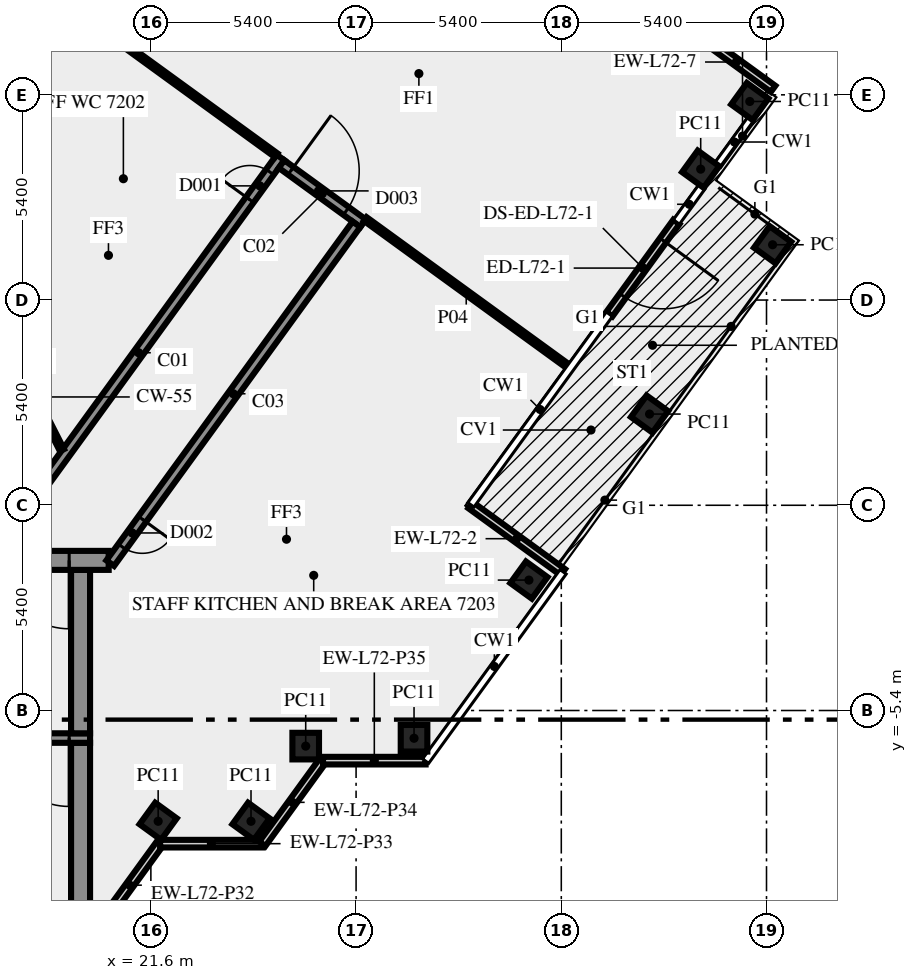
"""IFC4 building model, lengths in metres.
Left out: names, types, materials, properties, quantities, classifications, styles, units other than length and angle.
Written with IfcOpenShell. Run it as: python <this file> out.ifc"""

import sys

from ifc_helpers import new_model, si_unit, direction, frame, frame_2d, origin, origin_2d, place, context, subcontext, project, spatial, rectangle, extrude, element, fill, save


model = new_model("IFC4")
c1 = context("Model", 3, precision=1e-05, world=origin(), true_north=direction((0.0, 1.0)))
c2 = subcontext(c1, "Body", "Model", "MODEL_VIEW")
j1 = project(units=[si_unit("LENGTHUNIT", "METRE"), si_unit("PLANEANGLEUNIT", "RADIAN")], contexts=[c1])
p1 = place(None, origin())
s1 = spatial("IfcSite", under=j1, at=p1, CompositionType="ELEMENT")
p2 = place(p1, origin())
s2 = spatial("IfcBuilding", under=s1, at=p2, CompositionType="ELEMENT")
p3 = place(p2, frame((0.0, 0.0, 311.0)))
s3 = spatial("IfcBuildingStorey", under=s2, at=p3, CompositionType="ELEMENT", Elevation=311.0)
for number, where, z_axis, x_axis in (
    (1, (21.792, -8.315, 0.0), (0.0, 0.0, 1.0), (0.588, 0.809, 0.0)),
    (2, (24.235, -8.315, 0.0), (0.0, 0.0, 1.0), (0.588, 0.809, 0.0)),
    (3, (25.674, -6.337, 0.0), (0.0, 0.0, 1.0), (1.0, 0.0, 0.0)),
    (4, (28.525, -6.13, 0.0), (0.0, 0.0, 1.0), (1.0, 0.0, 0.0)),
    (5, (31.548, -1.969, 0.0), (0.0, 0.0, 1.0), (0.588, 0.809, 0.0)),
    (6, (34.722, 2.4, 0.0), (0.0, 0.0, 1.0), (0.588, 0.809, 0.0)),
    (7, (37.96, 6.855, 0.0), (0.0, 0.0, 1.0), (0.588, 0.809, 0.0)),
    (8, (36.068, 8.844, 0.0), (0.0, 0.0, 1.0), (0.588, 0.809, 0.0)),
    (9, (37.36, 10.625, 0.0), (0.0, 0.0, 1.0), (0.588, 0.809, 0.0)),
):
    element("IfcColumn", number, at=place(p3, frame(where, z_axis=z_axis, x_axis=x_axis)), inside=s3, PredefinedType="COLUMN", context=c2, shape_type="SweptSolid", body=[
        extrude(rectangle(XDim=0.7, YDim=0.7, at=origin_2d()), origin(), (0.0, 0.0, 1.0), 3.65),
    ])
p4 = place(p3, frame((32.441, -1.761, 0.0), z_axis=(0.0, 0.0, 1.0), x_axis=(-0.808999938455, 0.587808727036, 0.0)))
e10 = element("IfcWall", 10, at=p4, inside=s3, PredefinedType="SOLIDWALL", context=c2, shape_type="SweptSolid", body=[
    extrude(rectangle(XDim=3.0, YDim=0.2, at=frame_2d((1.5, 0.0))), origin(), (0.0, 0.0, 1.0), 3.65),
])
p5 = place(p3, frame((35.428, 7.455, 0.0), z_axis=(0.0, 0.0, 1.0), x_axis=(-0.587755461469, -0.809038637837, 0.0)))
e11 = element("IfcWall", 11, at=p5, inside=s3, PredefinedType="SOLIDWALL", context=c2, shape_type="SweptSolid", body=[
    extrude(rectangle(XDim=3.0, YDim=0.2, at=frame_2d((1.5, 0.0))), origin(), (0.0, 0.0, 1.0), 3.65),
])
p6 = place(p5, frame((0.6, 0.0, 0.0)))
e12 = element("IfcOpeningElement", 12, at=p6, cuts=e11, PredefinedType="OPENING", context=c2, shape_type="SweptSolid", body=[
    extrude(rectangle(XDim=1.8, YDim=2.4, at=frame_2d((0.9, 1.2))), frame((0.0, 0.11, 0.0), z_axis=(0.0, -1.0, 0.0), x_axis=(1.0, 0.0, 0.0)), (0.0, 0.0, 1.0), 0.22),
])
p7 = place(p3, frame((37.974, 10.958, 0.0), z_axis=(0.0, 0.0, 1.0), x_axis=(-0.809026317077, 0.587772420479, 0.0)))
e13 = element("IfcWall", 13, at=p7, inside=s3, PredefinedType="SOLIDWALL", context=c2, shape_type="SweptSolid", body=[
    extrude(rectangle(XDim=2.4, YDim=0.2, at=frame_2d((1.2, 0.0))), origin(), (0.0, 0.0, 1.0), 3.65),
])
p8 = place(p3, frame((20.253, -11.083, 0.0), z_axis=(0.0, 0.0, 1.0), x_axis=(0.587766567315, 0.809030569476, 0.0)))
e14 = element("IfcWall", 14, at=p8, inside=s3, PredefinedType="SOLIDWALL", context=c2, shape_type="SweptSolid", body=[
    extrude(rectangle(XDim=2.688, YDim=0.2, at=frame_2d((1.344, 0.0))), origin(), (0.0, 0.0, 1.0), 3.65),
])
p9 = place(p3, frame((21.843, -8.904, 0.0), z_axis=(0.0, 0.0, 1.0), x_axis=(1.0, 0.0, 0.0)))
e15 = element("IfcWall", 15, at=p9, inside=s3, PredefinedType="SOLIDWALL", context=c2, shape_type="SweptSolid", body=[
    extrude(rectangle(XDim=2.7, YDim=0.2, at=frame_2d((1.35, 0.0))), origin(), (0.0, 0.0, 1.0), 3.65),
])
p10 = place(p3, frame((24.533, -8.909, 0.0), z_axis=(0.0, 0.0, 1.0), x_axis=(0.587720002413, 0.809064397168, 0.0)))
e16 = element("IfcWall", 16, at=p10, inside=s3, PredefinedType="SOLIDWALL", context=c2, shape_type="SweptSolid", body=[
    extrude(rectangle(XDim=2.7, YDim=0.2, at=frame_2d((1.35, 0.0))), origin(), (0.0, 0.0, 1.0), 3.65),
])
p11 = place(p3, frame((26.13, -6.719, 0.0), z_axis=(0.0, 0.0, 1.0), x_axis=(1.0, 0.0, 0.0)))
e17 = element("IfcWall", 17, at=p11, inside=s3, PredefinedType="SOLIDWALL", context=c2, shape_type="SweptSolid", body=[
    extrude(rectangle(XDim=2.7, YDim=0.2, at=frame_2d((1.35, 0.0))), origin(), (0.0, 0.0, 1.0), 3.65),
])
p12 = place(p3, frame((19.75, -10.5, 0.0), z_axis=(0.0, 0.0, 1.0), x_axis=(0.0, 1.0, 0.0)))
e18 = element("IfcWall", 18, at=p12, inside=s3, PredefinedType="SHEAR", context=c2, shape_type="SweptSolid", body=[
    extrude(rectangle(XDim=4.25, YDim=0.5, at=frame_2d((2.125, 0.0))), origin(), (0.0, 0.0, 1.0), 3.65),
])
p13 = place(p3, frame((20.0, -6.125, 0.0), z_axis=(0.0, 0.0, 1.0), x_axis=(-1.0, 0.0, 0.0)))
e19 = element("IfcWall", 19, at=p13, inside=s3, PredefinedType="SHEAR", context=c2, shape_type="SweptSolid", body=[
    extrude(rectangle(XDim=10.2, YDim=0.25, at=frame_2d((5.1, 0.0))), origin(), (0.0, 0.0, 1.0), 3.65),
])
p14 = place(p13, frame((0.55, 0.0, 0.0)))
e20 = element("IfcOpeningElement", 20, at=p14, cuts=e19, PredefinedType="OPENING", context=c2, shape_type="SweptSolid", body=[
    extrude(rectangle(XDim=1.8, YDim=2.1, at=frame_2d((0.9, 1.05))), frame((0.0, 0.135, 0.0), z_axis=(0.0, -1.0, 0.0), x_axis=(1.0, 0.0, 0.0)), (0.0, 0.0, 1.0), 0.27),
])
p15 = place(p3, frame((19.75, -6.0, 0.0), z_axis=(0.0, 0.0, 1.0), x_axis=(0.0, 1.0, 0.0)))
e21 = element("IfcWall", 21, at=p15, inside=s3, PredefinedType="SHEAR", context=c2, shape_type="SweptSolid", body=[
    extrude(rectangle(XDim=4.3, YDim=0.5, at=frame_2d((2.15, 0.0))), origin(), (0.0, 0.0, 1.0), 3.65),
])
p16 = place(p3, frame((20.49, -1.45, 0.0), z_axis=(0.0, 0.0, 1.0), x_axis=(-1.0, 0.0, 0.0)))
e22 = element("IfcWall", 22, at=p16, inside=s3, PredefinedType="SHEAR", context=c2, shape_type="SweptSolid", body=[
    extrude(rectangle(XDim=40.98, YDim=0.5, at=frame_2d((20.49, 0.0))), origin(), (0.0, 0.0, 1.0), 3.65),
])
p17 = place(p16, frame((38.14, 0.0, 0.0)))
e23 = element("IfcOpeningElement", 23, at=p17, cuts=e22, PredefinedType="OPENING", context=c2, shape_type="SweptSolid", body=[
    extrude(rectangle(XDim=1.8, YDim=2.1, at=frame_2d((0.9, 1.05))), frame((0.0, 0.26, 0.0), z_axis=(0.0, -1.0, 0.0), x_axis=(1.0, 0.0, 0.0)), (0.0, 0.0, 1.0), 0.52),
])
p18 = place(p16, frame((35.89, 0.0, 0.0)))
e24 = element("IfcOpeningElement", 24, at=p18, cuts=e22, PredefinedType="OPENING", context=c2, shape_type="SweptSolid", body=[
    extrude(rectangle(XDim=0.9, YDim=2.1, at=frame_2d((0.45, 1.05))), frame((0.0, 0.26, 0.0), z_axis=(0.0, -1.0, 0.0), x_axis=(1.0, 0.0, 0.0)), (0.0, 0.0, 1.0), 0.52),
])
p19 = place(p16, frame((32.94, 0.0, 0.0)))
e25 = element("IfcOpeningElement", 25, at=p19, cuts=e22, PredefinedType="OPENING", context=c2, shape_type="SweptSolid", body=[
    extrude(rectangle(XDim=0.9, YDim=2.1, at=frame_2d((0.45, 1.05))), frame((0.0, 0.26, 0.0), z_axis=(0.0, -1.0, 0.0), x_axis=(1.0, 0.0, 0.0)), (0.0, 0.0, 1.0), 0.52),
])
p20 = place(p16, frame((31.015, 0.0, 0.0)))
e26 = element("IfcOpeningElement", 26, at=p20, cuts=e22, PredefinedType="OPENING", context=c2, shape_type="SweptSolid", body=[
    extrude(rectangle(XDim=0.8, YDim=2.1, at=frame_2d((0.4, 1.05))), frame((0.0, 0.26, 0.0), z_axis=(0.0, -1.0, 0.0), x_axis=(1.0, 0.0, 0.0)), (0.0, 0.0, 1.0), 0.52),
])
p21 = place(p16, frame((24.765, 0.0, 0.0)))
e27 = element("IfcOpeningElement", 27, at=p21, cuts=e22, PredefinedType="OPENING", context=c2, shape_type="SweptSolid", body=[
    extrude(rectangle(XDim=0.8, YDim=2.1, at=frame_2d((0.4, 1.05))), frame((0.0, 0.26, 0.0), z_axis=(0.0, -1.0, 0.0), x_axis=(1.0, 0.0, 0.0)), (0.0, 0.0, 1.0), 0.52),
])
p22 = place(p16, frame((21.765, 0.0, 0.0)))
e28 = element("IfcOpeningElement", 28, at=p22, cuts=e22, PredefinedType="OPENING", context=c2, shape_type="SweptSolid", body=[
    extrude(rectangle(XDim=2.0, YDim=2.1, at=frame_2d((1.0, 1.05))), frame((0.0, 0.26, 0.0), z_axis=(0.0, -1.0, 0.0), x_axis=(1.0, 0.0, 0.0)), (0.0, 0.0, 1.0), 0.52),
])
p23 = place(p16, frame((12.24, 0.0, 0.0)))
e29 = element("IfcOpeningElement", 29, at=p23, cuts=e22, PredefinedType="OPENING", context=c2, shape_type="SweptSolid", body=[
    extrude(rectangle(XDim=0.9, YDim=2.1, at=frame_2d((0.45, 1.05))), frame((0.0, 0.26, 0.0), z_axis=(0.0, -1.0, 0.0), x_axis=(1.0, 0.0, 0.0)), (0.0, 0.0, 1.0), 0.52),
])
p24 = place(p16, frame((7.14, 0.0, 0.0)))
e30 = element("IfcOpeningElement", 30, at=p24, cuts=e22, PredefinedType="OPENING", context=c2, shape_type="SweptSolid", body=[
    extrude(rectangle(XDim=0.9, YDim=2.1, at=frame_2d((0.45, 1.05))), frame((0.0, 0.26, 0.0), z_axis=(0.0, -1.0, 0.0), x_axis=(1.0, 0.0, 0.0)), (0.0, 0.0, 1.0), 0.52),
])
p25 = place(p16, frame((5.028, 0.0, 0.0)))
e31 = element("IfcOpeningElement", 31, at=p25, cuts=e22, PredefinedType="OPENING", context=c2, shape_type="SweptSolid", body=[
    extrude(rectangle(XDim=0.8, YDim=2.1, at=frame_2d((0.4, 1.05))), frame((0.0, 0.26, 0.0), z_axis=(0.0, -1.0, 0.0), x_axis=(1.0, 0.0, 0.0)), (0.0, 0.0, 1.0), 0.52),
])
p26 = place(p16, frame((3.452, 0.0, 0.0)))
e32 = element("IfcOpeningElement", 32, at=p26, cuts=e22, PredefinedType="OPENING", context=c2, shape_type="SweptSolid", body=[
    extrude(rectangle(XDim=0.8, YDim=2.1, at=frame_2d((0.4, 1.05))), frame((0.0, 0.26, 0.0), z_axis=(0.0, -1.0, 0.0), x_axis=(1.0, 0.0, 0.0)), (0.0, 0.0, 1.0), 0.52),
])
p27 = place(p16, frame((1.04, 0.0, 0.0)))
e33 = element("IfcOpeningElement", 33, at=p27, cuts=e22, PredefinedType="OPENING", context=c2, shape_type="SweptSolid", body=[
    extrude(rectangle(XDim=1.8, YDim=2.1, at=frame_2d((0.9, 1.05))), frame((0.0, 0.26, 0.0), z_axis=(0.0, -1.0, 0.0), x_axis=(1.0, 0.0, 0.0)), (0.0, 0.0, 1.0), 0.52),
])
p28 = place(p3, frame((17.545, -1.125, 0.0), z_axis=(0.0, 0.0, 1.0), x_axis=(0.587796810203, 0.809008596935, 0.0)))
e34 = element("IfcWall", 34, at=p28, inside=s3, PredefinedType="SOLIDWALL", context=c2, shape_type="SweptSolid", body=[
    extrude(rectangle(XDim=12.703, YDim=0.25, at=frame_2d((6.352, 0.0))), origin(), (0.0, 0.0, 1.0), 3.65),
])
p29 = place(p28, frame((11.329, 0.0, 0.0)))
e35 = element("IfcOpeningElement", 35, at=p29, cuts=e34, PredefinedType="OPENING", context=c2, shape_type="SweptSolid", body=[
    extrude(rectangle(XDim=0.9, YDim=2.1, at=frame_2d((0.45, 1.05))), frame((0.0, 0.135, 0.0), z_axis=(0.0, -1.0, 0.0), x_axis=(1.0, 0.0, 0.0)), (0.0, 0.0, 1.0), 0.27),
])
p30 = place(p3, frame((25.039, 8.978, 0.0), z_axis=(0.0, 0.0, 1.0), x_axis=(0.809006914995, -0.587799125119, 0.0)))
e36 = element("IfcWall", 36, at=p30, inside=s3, PredefinedType="SOLIDWALL", context=c2, shape_type="SweptSolid", body=[
    extrude(rectangle(XDim=2.65, YDim=0.25, at=frame_2d((1.325, 0.0))), origin(), (0.0, 0.0, 1.0), 3.65),
])
p31 = place(p30, frame((0.301, 0.0, 0.0)))
e37 = element("IfcOpeningElement", 37, at=p31, cuts=e36, PredefinedType="OPENING", context=c2, shape_type="SweptSolid", body=[
    extrude(rectangle(XDim=1.8, YDim=2.1, at=frame_2d((0.9, 1.05))), frame((0.0, 0.135, 0.0), z_axis=(0.0, -1.0, 0.0), x_axis=(1.0, 0.0, 0.0)), (0.0, 0.0, 1.0), 0.27),
])
p32 = place(p3, frame((27.009, 7.392, 0.0), z_axis=(0.0, 0.0, 1.0), x_axis=(-0.587776457057, -0.809023384414, 0.0)))
e38 = element("IfcWall", 38, at=p32, inside=s3, PredefinedType="SOLIDWALL", context=c2, shape_type="SweptSolid", body=[
    extrude(rectangle(XDim=11.021, YDim=0.25, at=frame_2d((5.51, 0.0))), origin(), (0.0, 0.0, 1.0), 3.65),
])
p33 = place(p32, frame((9.588, 0.0, 0.0)))
e39 = element("IfcOpeningElement", 39, at=p33, cuts=e38, PredefinedType="OPENING", context=c2, shape_type="SweptSolid", body=[
    extrude(rectangle(XDim=0.9, YDim=2.1, at=frame_2d((0.45, 1.05))), frame((0.0, 0.135, 0.0), z_axis=(0.0, -1.0, 0.0), x_axis=(1.0, 0.0, 0.0)), (0.0, 0.0, 1.0), 0.27),
])
p34 = place(p3, frame((24.898, 9.21, 0.0), z_axis=(0.0, 0.0, 1.0), x_axis=(-0.809046636998, 0.587744450559, 0.0)))
e40 = element("IfcWall", 40, at=p34, inside=s3, PredefinedType="PARTITIONING", context=c2, shape_type="SweptSolid", body=[
    extrude(rectangle(XDim=9.549, YDim=0.12, at=frame_2d((4.775, 0.0))), origin(), (0.0, 0.0, 1.0), 2.95),
])
p35 = place(p3, frame((27.241, 7.533, 0.0), z_axis=(0.0, 0.0, 1.0), x_axis=(0.809057351259, -0.587729701796, 0.0)))
e41 = element("IfcWall", 41, at=p35, inside=s3, PredefinedType="PARTITIONING", context=c2, shape_type="SweptSolid", body=[
    extrude(rectangle(XDim=6.57, YDim=0.12, at=frame_2d((3.285, 0.0))), origin(), (0.0, 0.0, 1.0), 3.65),
])
p36 = place(p3, frame((18.0, 3.925, 0.0), z_axis=(0.0, 0.0, 1.0), x_axis=(0.453950796792, -0.891026752736, 0.0)))
e42 = element("IfcWall", 42, at=p36, inside=s3, PredefinedType="PARTITIONING", context=c2, shape_type="SweptSolid", body=[
    extrude(rectangle(XDim=2.778, YDim=0.12, at=frame_2d((1.389, 0.0))), origin(), (0.0, 0.0, 1.0), 3.65),
])
p37 = place(p6, origin())
e43 = element("IfcDoor", 43, at=p37, inside=s3, OperationType="DOUBLE_DOOR_SINGLE_SWING", PredefinedType="DOOR", context=c2, shape_type="SweptSolid", body=[
    extrude(rectangle(XDim=1.8, YDim=2.4, at=frame_2d((0.9, 1.2))), frame((0.0, 0.025, 0.0), z_axis=(0.0, -1.0, 0.0), x_axis=(1.0, 0.0, 0.0)), (0.0, 0.0, 1.0), 0.05),
])
fill(e12, e43)
p38 = place(p14, origin())
e44 = element("IfcDoor", 44, at=p38, inside=s3, OperationType="DOUBLE_DOOR_SINGLE_SWING", PredefinedType="DOOR", context=c2, shape_type="SweptSolid", body=[
    extrude(rectangle(XDim=1.8, YDim=2.1, at=frame_2d((0.9, 1.05))), frame((0.0, 0.025, 0.0), z_axis=(0.0, -1.0, 0.0), x_axis=(1.0, 0.0, 0.0)), (0.0, 0.0, 1.0), 0.05),
])
fill(e20, e44)
p39 = place(p27, origin())
e45 = element("IfcDoor", 45, at=p39, inside=s3, OperationType="DOUBLE_DOOR_SINGLE_SWING", PredefinedType="DOOR", context=c2, shape_type="SweptSolid", body=[
    extrude(rectangle(XDim=1.8, YDim=2.1, at=frame_2d((0.9, 1.05))), frame((0.0, 0.025, 0.0), z_axis=(0.0, -1.0, 0.0), x_axis=(1.0, 0.0, 0.0)), (0.0, 0.0, 1.0), 0.05),
])
fill(e33, e45)
p40 = place(p29, origin())
e46 = element("IfcDoor", 46, at=p40, inside=s3, OperationType="SINGLE_SWING_RIGHT", PredefinedType="DOOR", context=c2, shape_type="SweptSolid", body=[
    extrude(rectangle(XDim=0.9, YDim=2.1, at=frame_2d((0.45, 1.05))), frame((0.0, 0.025, 0.0), z_axis=(0.0, -1.0, 0.0), x_axis=(1.0, 0.0, 0.0)), (0.0, 0.0, 1.0), 0.05),
])
fill(e35, e46)
p41 = place(p31, origin())
e47 = element("IfcDoor", 47, at=p41, inside=s3, OperationType="DOUBLE_DOOR_SINGLE_SWING", PredefinedType="DOOR", context=c2, shape_type="SweptSolid", body=[
    extrude(rectangle(XDim=1.8, YDim=2.1, at=frame_2d((0.9, 1.05))), frame((0.0, 0.025, 0.0), z_axis=(0.0, -1.0, 0.0), x_axis=(1.0, 0.0, 0.0)), (0.0, 0.0, 1.0), 0.05),
])
fill(e37, e47)
p42 = place(p33, origin())
e48 = element("IfcDoor", 48, at=p42, inside=s3, OperationType="SINGLE_SWING_RIGHT", PredefinedType="DOOR", context=c2, shape_type="SweptSolid", body=[
    extrude(rectangle(XDim=0.9, YDim=2.1, at=frame_2d((0.45, 1.05))), frame((0.0, 0.025, 0.0), z_axis=(0.0, -1.0, 0.0), x_axis=(1.0, 0.0, 0.0)), (0.0, 0.0, 1.0), 0.05),
])
fill(e39, e48)
save(model, sys.argv[1])
